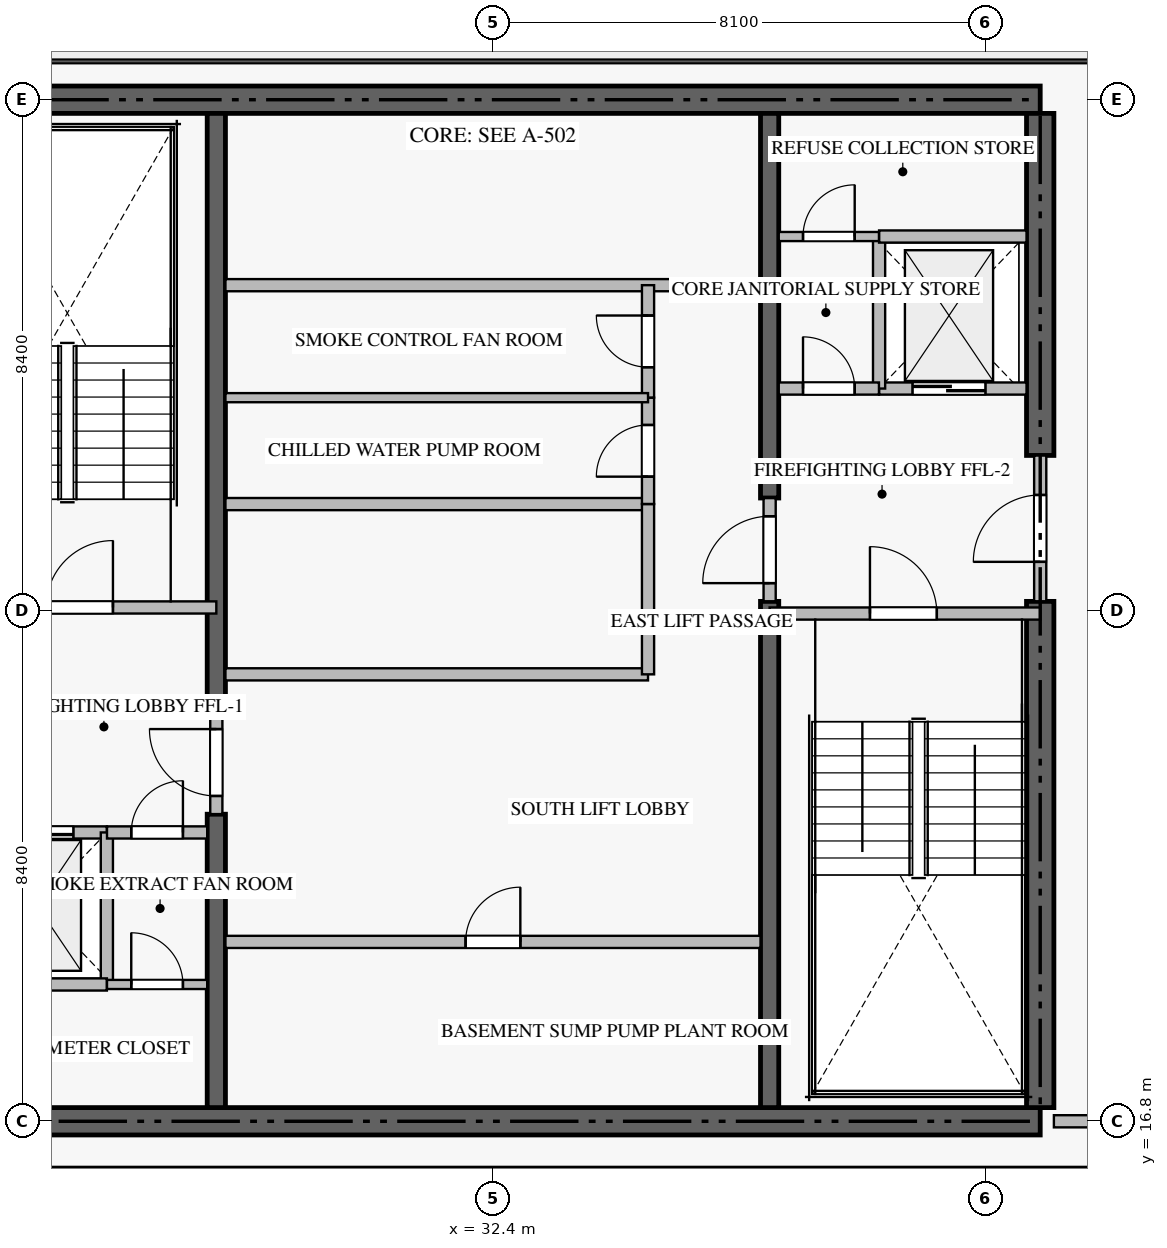
"""IFC4 building model, lengths in metres.
Left out: names, types, materials, properties, quantities, classifications, styles, units other than length and angle.
Written with IfcOpenShell. Run it as: python <this file> out.ifc"""

import sys

from ifc_helpers import new_model, si_unit, direction, frame, frame_2d, origin, place, context, subcontext, project, spatial, rectangle, extrude, source, transform, mapped, element, fill, save


model = new_model("IFC4")
c1 = context("Model", 3, precision=1e-05, world=origin(), true_north=direction((0.0, 1.0)))
c2 = subcontext(c1, "Body", "Model", "MODEL_VIEW")
j1 = project(units=[si_unit("LENGTHUNIT", "METRE"), si_unit("PLANEANGLEUNIT", "RADIAN")], contexts=[c1])
p1 = place(None, origin())
s1 = spatial("IfcSite", under=j1, at=p1, CompositionType="ELEMENT")
p2 = place(p1, origin())
s2 = spatial("IfcBuilding", under=s1, at=p2, CompositionType="ELEMENT")
p3 = place(p2, frame((0.0, 0.0, -7.2)))
s3 = spatial("IfcBuildingStorey", under=s2, at=p3, CompositionType="ELEMENT", Elevation=-7.2)
for number, where, z_axis, x_axis in (
    (1, (23.4, 16.8, -0.36), (0.0, 0.0, 1.0), (1.0, 0.0, 0.0)),
    (2, (41.4, 33.6, -0.36), (0.0, 0.0, 1.0), (-1.0, 0.0, 0.0)),
):
    element("IfcWall", number, at=place(p3, frame(where, z_axis=z_axis, x_axis=x_axis)), inside=s3, PredefinedType="SHEAR", context=c2, shape_type="SweptSolid", body=[
        extrude(rectangle(XDim=18.0, YDim=0.45, at=frame_2d((9.0, 0.0))), origin(), (0.0, 0.0, 1.0), 3.598),
    ])
p4 = place(p3, frame((41.4, 17.025, -0.36), z_axis=(0.0, 0.0, 1.0), x_axis=(0.0, 1.0, 0.0)))
e3 = element("IfcWall", 3, at=p4, inside=s3, PredefinedType="SHEAR", context=c2, shape_type="SweptSolid", body=[
    extrude(rectangle(XDim=8.325, YDim=0.45, at=frame_2d((4.163, 0.0))), origin(), (0.0, 0.0, 1.0), 3.598),
])
p5 = place(p3, frame((41.4, 27.75, -0.36), z_axis=(0.0, 0.0, 1.0), x_axis=(0.0, 1.0, 0.0)))
e4 = element("IfcWall", 4, at=p5, inside=s3, PredefinedType="SHEAR", context=c2, shape_type="SweptSolid", body=[
    extrude(rectangle(XDim=5.625, YDim=0.45, at=frame_2d((2.812, 0.0))), origin(), (0.0, 0.0, 1.0), 3.598),
])
p6 = place(p3, frame((27.85, 17.025, -0.36), z_axis=(0.0, 0.0, 1.0), x_axis=(0.0, 1.0, 0.0)))
e5 = element("IfcWall", 5, at=p6, inside=s3, PredefinedType="SHEAR", context=c2, shape_type="SweptSolid", body=[
    extrude(rectangle(XDim=4.825, YDim=0.3, at=frame_2d((2.413, 0.0))), origin(), (0.0, 0.0, 1.0), 3.598),
])
p7 = place(p3, frame((27.85, 23.55, -0.36), z_axis=(0.0, 0.0, 1.0), x_axis=(0.0, 1.0, 0.0)))
e6 = element("IfcWall", 6, at=p7, inside=s3, PredefinedType="SHEAR", context=c2, shape_type="SweptSolid", body=[
    extrude(rectangle(XDim=9.825, YDim=0.3, at=frame_2d((4.913, 0.0))), origin(), (0.0, 0.0, 1.0), 3.598),
])
p8 = place(p3, frame((36.95, 17.025, -0.36), z_axis=(0.0, 0.0, 1.0), x_axis=(0.0, 1.0, 0.0)))
e7 = element("IfcWall", 7, at=p8, inside=s3, PredefinedType="SHEAR", context=c2, shape_type="SweptSolid", body=[
    extrude(rectangle(XDim=8.325, YDim=0.3, at=frame_2d((4.163, 0.0))), origin(), (0.0, 0.0, 1.0), 3.598),
])
p9 = place(p3, frame((36.95, 27.05, -0.36), z_axis=(0.0, 0.0, 1.0), x_axis=(0.0, 1.0, 0.0)))
e8 = element("IfcWall", 8, at=p9, inside=s3, PredefinedType="SHEAR", context=c2, shape_type="SweptSolid", body=[
    extrude(rectangle(XDim=6.325, YDim=0.3, at=frame_2d((3.163, 0.0))), origin(), (0.0, 0.0, 1.0), 3.598),
])
p10 = place(p3, frame((23.4, 25.25, 0.0), z_axis=(0.0, 0.0, 1.0), x_axis=(1.0, 0.0, 0.0)))
e9 = element("IfcWall", 9, at=p10, inside=s3, PredefinedType="STANDARD", context=c2, shape_type="SweptSolid", body=[
    extrude(rectangle(XDim=4.45, YDim=0.2, at=frame_2d((2.225, 0.0))), origin(), (0.0, 0.0, 1.0), 3.24),
])
p11 = place(p10, frame((1.65, 0.0, 0.0)))
e10 = element("IfcOpeningElement", 10, at=p11, cuts=e9, PredefinedType="OPENING", context=c2, shape_type="SweptSolid", body=[
    extrude(rectangle(XDim=1.1, YDim=2.15, at=frame_2d((0.55, 1.075))), frame((0.0, 0.11, 0.0), z_axis=(0.0, -1.0, 0.0), x_axis=(1.0, 0.0, 0.0)), (0.0, 0.0, 1.0), 0.22),
])
p12 = place(p3, frame((36.95, 25.15, 0.0), z_axis=(0.0, 0.0, 1.0), x_axis=(1.0, 0.0, 0.0)))
e11 = element("IfcWall", 11, at=p12, inside=s3, PredefinedType="STANDARD", context=c2, shape_type="SweptSolid", body=[
    extrude(rectangle(XDim=4.45, YDim=0.2, at=frame_2d((2.225, 0.0))), origin(), (0.0, 0.0, 1.0), 3.24),
])
p13 = place(p12, frame((1.65, 0.0, 0.0)))
e12 = element("IfcOpeningElement", 12, at=p13, cuts=e11, PredefinedType="OPENING", context=c2, shape_type="SweptSolid", body=[
    extrude(rectangle(XDim=1.1, YDim=2.15, at=frame_2d((0.55, 1.075))), frame((0.0, 0.11, 0.0), z_axis=(0.0, -1.0, 0.0), x_axis=(1.0, 0.0, 0.0)), (0.0, 0.0, 1.0), 0.22),
])
p14 = place(p3, frame((23.625, 21.55, 0.0), z_axis=(0.0, 0.0, 1.0), x_axis=(1.0, 0.0, 0.0)))
e13 = element("IfcWall", 13, at=p14, inside=s3, PredefinedType="STANDARD", context=c2, shape_type="SweptSolid", body=[
    extrude(rectangle(XDim=2.425, YDim=0.2, at=frame_2d((1.212, 0.0))), origin(), (0.0, 0.0, 1.0), 3.24),
])
p15 = place(p14, frame((0.675, 0.0, 0.0)))
e14 = element("IfcOpeningElement", 14, at=p15, cuts=e13, PredefinedType="OPENING", context=c2, shape_type="SweptSolid", body=[
    extrude(rectangle(XDim=1.2, YDim=2.2, at=frame_2d((0.6, 1.1))), frame((0.0, 0.11, 0.0), z_axis=(0.0, -1.0, 0.0), x_axis=(1.0, 0.0, 0.0)), (0.0, 0.0, 1.0), 0.22),
])
p16 = place(p3, frame((38.75, 28.85, 0.0), z_axis=(0.0, 0.0, 1.0), x_axis=(1.0, 0.0, 0.0)))
e15 = element("IfcWall", 15, at=p16, inside=s3, PredefinedType="STANDARD", context=c2, shape_type="SweptSolid", body=[
    extrude(rectangle(XDim=2.425, YDim=0.2, at=frame_2d((1.212, 0.0))), origin(), (0.0, 0.0, 1.0), 3.24),
])
p17 = place(p16, frame((0.55, 0.0, 0.0)))
e16 = element("IfcOpeningElement", 16, at=p17, cuts=e15, PredefinedType="OPENING", context=c2, shape_type="SweptSolid", body=[
    extrude(rectangle(XDim=1.2, YDim=2.2, at=frame_2d((0.6, 1.1))), frame((0.0, 0.11, 0.0), z_axis=(0.0, -1.0, 0.0), x_axis=(1.0, 0.0, 0.0)), (0.0, 0.0, 1.0), 0.22),
])
p18 = place(p3, frame((26.05, 19.05, 0.0), z_axis=(0.0, 0.0, 1.0), x_axis=(0.0, 1.0, 0.0)))
e17 = element("IfcWall", 17, at=p18, inside=s3, PredefinedType="STANDARD", context=c2, shape_type="SweptSolid", body=[
    extrude(rectangle(XDim=2.5, YDim=0.2, at=frame_2d((1.25, 0.0))), origin(), (0.0, 0.0, 1.0), 3.24),
])
p19 = place(p3, frame((23.625, 19.05, 0.0), z_axis=(0.0, 0.0, 1.0), x_axis=(1.0, 0.0, 0.0)))
e18 = element("IfcWall", 18, at=p19, inside=s3, PredefinedType="STANDARD", context=c2, shape_type="SweptSolid", body=[
    extrude(rectangle(XDim=2.425, YDim=0.2, at=frame_2d((1.212, 0.0))), origin(), (0.0, 0.0, 1.0), 3.24),
])
p20 = place(p3, frame((26.052, 21.55, 0.0), z_axis=(0.0, 0.0, 1.0), x_axis=(1.0, 0.0, 0.0)))
e19 = element("IfcWall", 19, at=p20, inside=s3, PredefinedType="STANDARD", context=c2, shape_type="SweptSolid", body=[
    extrude(rectangle(XDim=1.648, YDim=0.2, at=frame_2d((0.824, 0.0))), origin(), (0.0, 0.0, 1.0), 3.24),
])
p21 = place(p20, frame((0.399, 0.0, 0.0)))
e20 = element("IfcOpeningElement", 20, at=p21, cuts=e19, PredefinedType="OPENING", context=c2, shape_type="SweptSolid", body=[
    extrude(rectangle(XDim=0.85, YDim=2.1, at=frame_2d((0.425, 1.05))), frame((0.0, 0.11, 0.0), z_axis=(0.0, -1.0, 0.0), x_axis=(1.0, 0.0, 0.0)), (0.0, 0.0, 1.0), 0.22),
])
p22 = place(p3, frame((38.75, 28.85, 0.0), z_axis=(0.0, 0.0, 1.0), x_axis=(0.0, 1.0, 0.0)))
e21 = element("IfcWall", 21, at=p22, inside=s3, PredefinedType="STANDARD", context=c2, shape_type="SweptSolid", body=[
    extrude(rectangle(XDim=2.5, YDim=0.2, at=frame_2d((1.25, 0.0))), origin(), (0.0, 0.0, 1.0), 3.24),
])
p23 = place(p3, frame((38.75, 31.35, 0.0), z_axis=(0.0, 0.0, 1.0), x_axis=(1.0, 0.0, 0.0)))
e22 = element("IfcWall", 22, at=p23, inside=s3, PredefinedType="STANDARD", context=c2, shape_type="SweptSolid", body=[
    extrude(rectangle(XDim=2.425, YDim=0.2, at=frame_2d((1.212, 0.0))), origin(), (0.0, 0.0, 1.0), 3.24),
])
p24 = place(p3, frame((37.1, 28.85, 0.0), z_axis=(0.0, 0.0, 1.0), x_axis=(1.0, 0.0, 0.0)))
e23 = element("IfcWall", 23, at=p24, inside=s3, PredefinedType="STANDARD", context=c2, shape_type="SweptSolid", body=[
    extrude(rectangle(XDim=1.648, YDim=0.2, at=frame_2d((0.824, 0.0))), origin(), (0.0, 0.0, 1.0), 3.24),
])
p25 = place(p24, frame((0.399, 0.0, 0.0)))
e24 = element("IfcOpeningElement", 24, at=p25, cuts=e23, PredefinedType="OPENING", context=c2, shape_type="SweptSolid", body=[
    extrude(rectangle(XDim=0.85, YDim=2.1, at=frame_2d((0.425, 1.05))), frame((0.0, 0.11, 0.0), z_axis=(0.0, -1.0, 0.0), x_axis=(1.0, 0.0, 0.0)), (0.0, 0.0, 1.0), 0.22),
])
p26 = place(p3, frame((41.4, 25.352, 0.0), z_axis=(0.0, 0.0, 1.0), x_axis=(0.0, 1.0, 0.0)))
e25 = element("IfcWall", 25, at=p26, inside=s3, PredefinedType="STANDARD", context=c2, shape_type="SweptSolid", body=[
    extrude(rectangle(XDim=2.396, YDim=0.2, at=frame_2d((1.198, 0.0))), origin(), (0.0, 0.0, 1.0), 3.24),
])
p27 = place(p26, frame((0.648, 0.0, 0.0)))
e26 = element("IfcOpeningElement", 26, at=p27, cuts=e25, PredefinedType="OPENING", context=c2, shape_type="SweptSolid", body=[
    extrude(rectangle(XDim=1.1, YDim=2.15, at=frame_2d((0.55, 1.075))), frame((0.0, 0.11, 0.0), z_axis=(0.0, -1.0, 0.0), x_axis=(1.0, 0.0, 0.0)), (0.0, 0.0, 1.0), 0.22),
])
p28 = place(p3, frame((27.85, 21.852, 0.0), z_axis=(0.0, 0.0, 1.0), x_axis=(0.0, 1.0, 0.0)))
e27 = element("IfcWall", 27, at=p28, inside=s3, PredefinedType="STANDARD", context=c2, shape_type="SweptSolid", body=[
    extrude(rectangle(XDim=1.696, YDim=0.2, at=frame_2d((0.848, 0.0))), origin(), (0.0, 0.0, 1.0), 3.24),
])
p29 = place(p28, frame((0.298, 0.0, 0.0)))
e28 = element("IfcOpeningElement", 28, at=p29, cuts=e27, PredefinedType="OPENING", context=c2, shape_type="SweptSolid", body=[
    extrude(rectangle(XDim=1.1, YDim=2.15, at=frame_2d((0.55, 1.075))), frame((0.0, 0.11, 0.0), z_axis=(0.0, -1.0, 0.0), x_axis=(1.0, 0.0, 0.0)), (0.0, 0.0, 1.0), 0.22),
])
p30 = place(p3, frame((36.95, 25.352, 0.0), z_axis=(0.0, 0.0, 1.0), x_axis=(0.0, 1.0, 0.0)))
e29 = element("IfcWall", 29, at=p30, inside=s3, PredefinedType="STANDARD", context=c2, shape_type="SweptSolid", body=[
    extrude(rectangle(XDim=1.696, YDim=0.2, at=frame_2d((0.848, 0.0))), origin(), (0.0, 0.0, 1.0), 3.24),
])
p31 = place(p30, frame((0.298, 0.0, 0.0)))
e30 = element("IfcOpeningElement", 30, at=p31, cuts=e29, PredefinedType="OPENING", context=c2, shape_type="SweptSolid", body=[
    extrude(rectangle(XDim=1.1, YDim=2.15, at=frame_2d((0.55, 1.075))), frame((0.0, 0.11, 0.0), z_axis=(0.0, -1.0, 0.0), x_axis=(1.0, 0.0, 0.0)), (0.0, 0.0, 1.0), 0.22),
])
p32 = place(p3, frame((28.0, 30.55, 0.0), z_axis=(0.0, 0.0, 1.0), x_axis=(1.0, 0.0, 0.0)))
e31 = element("IfcWall", 31, at=p32, inside=s3, PredefinedType="STANDARD", context=c2, shape_type="SweptSolid", body=[
    extrude(rectangle(XDim=8.8, YDim=0.2, at=frame_2d((4.4, 0.0))), origin(), (0.0, 0.0, 1.0), 3.24),
])
p33 = place(p3, frame((28.0, 19.75, 0.0), z_axis=(0.0, 0.0, 1.0), x_axis=(1.0, 0.0, 0.0)))
e32 = element("IfcWall", 32, at=p33, inside=s3, PredefinedType="STANDARD", context=c2, shape_type="SweptSolid", body=[
    extrude(rectangle(XDim=8.8, YDim=0.2, at=frame_2d((4.4, 0.0))), origin(), (0.0, 0.0, 1.0), 3.24),
])
p34 = place(p33, frame((3.95, 0.0, 0.0)))
e33 = element("IfcOpeningElement", 33, at=p34, cuts=e32, PredefinedType="OPENING", context=c2, shape_type="SweptSolid", body=[
    extrude(rectangle(XDim=0.9, YDim=2.1, at=frame_2d((0.45, 1.05))), frame((0.0, 0.11, 0.0), z_axis=(0.0, -1.0, 0.0), x_axis=(1.0, 0.0, 0.0)), (0.0, 0.0, 1.0), 0.22),
])
for number, where, z_axis, x_axis in (
    (34, (28.0, 24.15, 0.0), (0.0, 0.0, 1.0), (1.0, 0.0, 0.0)),
    (35, (28.0, 26.95, 0.0), (0.0, 0.0, 1.0), (1.0, 0.0, 0.0)),
):
    element("IfcWall", number, at=place(p3, frame(where, z_axis=z_axis, x_axis=x_axis)), inside=s3, PredefinedType="STANDARD", context=c2, shape_type="SweptSolid", body=[
        extrude(rectangle(XDim=6.95, YDim=0.2, at=frame_2d((3.475, 0.0))), origin(), (0.0, 0.0, 1.0), 3.24),
    ])
p35 = place(p3, frame((34.95, 24.15, 0.0), z_axis=(0.0, 0.0, 1.0), x_axis=(0.0, 1.0, 0.0)))
e36 = element("IfcWall", 36, at=p35, inside=s3, PredefinedType="STANDARD", context=c2, shape_type="SweptSolid", body=[
    extrude(rectangle(XDim=2.8, YDim=0.2, at=frame_2d((1.4, 0.0))), origin(), (0.0, 0.0, 1.0), 3.24),
])
p36 = place(p3, frame((26.052, 19.05, 0.0), z_axis=(0.0, 0.0, 1.0), x_axis=(1.0, 0.0, 0.0)))
e37 = element("IfcWall", 37, at=p36, inside=s3, PredefinedType="PARTITIONING", context=c2, shape_type="SweptSolid", body=[
    extrude(rectangle(XDim=1.648, YDim=0.15, at=frame_2d((0.824, 0.0))), origin(), (0.0, 0.0, 1.0), 3.24),
])
p37 = place(p36, frame((0.399, 0.0, 0.0)))
e38 = element("IfcOpeningElement", 38, at=p37, cuts=e37, PredefinedType="OPENING", context=c2, shape_type="SweptSolid", body=[
    extrude(rectangle(XDim=0.85, YDim=2.1, at=frame_2d((0.425, 1.05))), frame((0.0, 0.085, 0.0), z_axis=(0.0, -1.0, 0.0), x_axis=(1.0, 0.0, 0.0)), (0.0, 0.0, 1.0), 0.17),
])
p38 = place(p3, frame((37.1, 31.35, 0.0), z_axis=(0.0, 0.0, 1.0), x_axis=(1.0, 0.0, 0.0)))
e39 = element("IfcWall", 39, at=p38, inside=s3, PredefinedType="PARTITIONING", context=c2, shape_type="SweptSolid", body=[
    extrude(rectangle(XDim=1.648, YDim=0.15, at=frame_2d((0.824, 0.0))), origin(), (0.0, 0.0, 1.0), 3.24),
])
p39 = place(p38, frame((0.399, 0.0, 0.0)))
e40 = element("IfcOpeningElement", 40, at=p39, cuts=e39, PredefinedType="OPENING", context=c2, shape_type="SweptSolid", body=[
    extrude(rectangle(XDim=0.85, YDim=2.1, at=frame_2d((0.425, 1.05))), frame((0.0, 0.085, 0.0), z_axis=(0.0, -1.0, 0.0), x_axis=(1.0, 0.0, 0.0)), (0.0, 0.0, 1.0), 0.17),
])
p40 = place(p3, frame((34.95, 26.952, 0.0), z_axis=(0.0, 0.0, 1.0), x_axis=(0.0, 1.0, 0.0)))
e41 = element("IfcWall", 41, at=p40, inside=s3, PredefinedType="STANDARD", context=c2, shape_type="SweptSolid", body=[
    extrude(rectangle(XDim=1.748, YDim=0.2, at=frame_2d((0.874, 0.0))), origin(), (0.0, 0.0, 1.0), 3.24),
])
p41 = place(p40, frame((0.449, 0.0, 0.0)))
e42 = element("IfcOpeningElement", 42, at=p41, cuts=e41, PredefinedType="OPENING", context=c2, shape_type="SweptSolid", body=[
    extrude(rectangle(XDim=0.85, YDim=2.1, at=frame_2d((0.425, 1.05))), frame((0.0, 0.11, 0.0), z_axis=(0.0, -1.0, 0.0), x_axis=(1.0, 0.0, 0.0)), (0.0, 0.0, 1.0), 0.22),
])
p42 = place(p3, frame((34.95, 28.702, 0.0), z_axis=(0.0, 0.0, 1.0), x_axis=(0.0, 1.0, 0.0)))
e43 = element("IfcWall", 43, at=p42, inside=s3, PredefinedType="STANDARD", context=c2, shape_type="SweptSolid", body=[
    extrude(rectangle(XDim=1.848, YDim=0.2, at=frame_2d((0.924, 0.0))), origin(), (0.0, 0.0, 1.0), 3.24),
])
p43 = place(p42, frame((0.499, 0.0, 0.0)))
e44 = element("IfcOpeningElement", 44, at=p43, cuts=e43, PredefinedType="OPENING", context=c2, shape_type="SweptSolid", body=[
    extrude(rectangle(XDim=0.85, YDim=2.1, at=frame_2d((0.425, 1.05))), frame((0.0, 0.11, 0.0), z_axis=(0.0, -1.0, 0.0), x_axis=(1.0, 0.0, 0.0)), (0.0, 0.0, 1.0), 0.22),
])
p44 = place(p3, frame((28.0, 28.7, 0.0), z_axis=(0.0, 0.0, 1.0), x_axis=(1.0, 0.0, 0.0)))
e45 = element("IfcWall", 45, at=p44, inside=s3, PredefinedType="PARTITIONING", context=c2, shape_type="SweptSolid", body=[
    extrude(rectangle(XDim=6.95, YDim=0.15, at=frame_2d((3.475, 0.0))), origin(), (0.0, 0.0, 1.0), 3.24),
])
p45 = place(p3, frame((41.625, 16.8, 0.0), z_axis=(0.0, 0.0, 1.0), x_axis=(1.0, 0.0, 0.0)))
e46 = element("IfcWall", 46, at=p45, inside=s3, PredefinedType="STANDARD", context=c2, shape_type="SweptSolid", body=[
    extrude(rectangle(XDim=22.725, YDim=0.2, at=frame_2d((11.363, 0.0))), origin(), (0.0, 0.0, 1.0), 2.672),
])
p46 = place(p45, frame((4.697, 0.0, 0.0)))
e47 = element("IfcOpeningElement", 47, at=p46, cuts=e46, PredefinedType="OPENING", context=c2, shape_type="SweptSolid", body=[
    extrude(rectangle(XDim=3.8, YDim=2.5, at=frame_2d((1.9, 1.25))), frame((0.0, 0.11, 0.0), z_axis=(0.0, -1.0, 0.0), x_axis=(1.0, 0.0, 0.0)), (0.0, 0.0, 1.0), 0.22),
])
m1 = source(origin(), c2, "Body", "SweptSolid", [
    extrude(rectangle(XDim=1.1, YDim=2.15, at=frame_2d((0.55, 1.075))), frame((0.0, 0.025, 0.0), z_axis=(0.0, -1.0, 0.0), x_axis=(1.0, 0.0, 0.0)), (0.0, 0.0, 1.0), 0.05),
])
p47 = place(p11, origin())
e48 = element("IfcDoor", 48, at=p47, inside=s3, OperationType="SINGLE_SWING_RIGHT", PredefinedType="DOOR", context=c2, shape_type="MappedRepresentation", body=[
    mapped(m1, transform((0.0, 0.0, 0.0), scale=1.0)),
])
fill(e10, e48)
p48 = place(p13, origin())
e49 = element("IfcDoor", 49, at=p48, inside=s3, OperationType="SINGLE_SWING_LEFT", PredefinedType="DOOR", context=c2, shape_type="MappedRepresentation", body=[
    mapped(m1, transform((0.0, 0.0, 0.0), scale=1.0)),
])
fill(e12, e49)
m2 = source(origin(), c2, "Body", "SweptSolid", [
    extrude(rectangle(XDim=1.2, YDim=2.2, at=frame_2d((0.6, 1.1))), frame((0.0, 0.025, 0.0), z_axis=(0.0, -1.0, 0.0), x_axis=(1.0, 0.0, 0.0)), (0.0, 0.0, 1.0), 0.05),
])
p49 = place(p15, origin())
e50 = element("IfcDoor", 50, at=p49, inside=s3, OperationType="DOUBLE_DOOR_SLIDING", PredefinedType="DOOR", context=c2, shape_type="MappedRepresentation", body=[
    mapped(m2, transform((0.0, 0.0, 0.0), scale=1.0)),
])
fill(e14, e50)
p50 = place(p17, origin())
e51 = element("IfcDoor", 51, at=p50, inside=s3, OperationType="DOUBLE_DOOR_SLIDING", PredefinedType="DOOR", context=c2, shape_type="MappedRepresentation", body=[
    mapped(m2, transform((0.0, 0.0, 0.0), scale=1.0)),
])
fill(e16, e51)
m3 = source(origin(), c2, "Body", "SweptSolid", [
    extrude(rectangle(XDim=0.85, YDim=2.1, at=frame_2d((0.425, 1.05))), frame((0.0, 0.025, 0.0), z_axis=(0.0, -1.0, 0.0), x_axis=(1.0, 0.0, 0.0)), (0.0, 0.0, 1.0), 0.05),
])
p51 = place(p21, origin())
e52 = element("IfcDoor", 52, at=p51, inside=s3, OperationType="SINGLE_SWING_RIGHT", PredefinedType="DOOR", context=c2, shape_type="MappedRepresentation", body=[
    mapped(m3, transform((0.0, 0.0, 0.0), scale=1.0)),
])
fill(e20, e52)
p52 = place(p25, origin())
e53 = element("IfcDoor", 53, at=p52, inside=s3, OperationType="SINGLE_SWING_LEFT", PredefinedType="DOOR", context=c2, shape_type="MappedRepresentation", body=[
    mapped(m3, transform((0.0, 0.0, 0.0), scale=1.0)),
])
fill(e24, e53)
p53 = place(p27, origin())
e54 = element("IfcDoor", 54, at=p53, inside=s3, OperationType="SINGLE_SWING_LEFT", PredefinedType="DOOR", context=c2, shape_type="MappedRepresentation", body=[
    mapped(m1, transform((0.0, 0.0, 0.0), scale=1.0)),
])
fill(e26, e54)
p54 = place(p29, origin())
e55 = element("IfcDoor", 55, at=p54, inside=s3, OperationType="SINGLE_SWING_RIGHT", PredefinedType="DOOR", context=c2, shape_type="MappedRepresentation", body=[
    mapped(m1, transform((0.0, 0.0, 0.0), scale=1.0)),
])
fill(e28, e55)
p55 = place(p31, origin())
e56 = element("IfcDoor", 56, at=p55, inside=s3, OperationType="SINGLE_SWING_LEFT", PredefinedType="DOOR", context=c2, shape_type="MappedRepresentation", body=[
    mapped(m1, transform((0.0, 0.0, 0.0), scale=1.0)),
])
fill(e30, e56)
m4 = source(origin(), c2, "Body", "SweptSolid", [
    extrude(rectangle(XDim=0.9, YDim=2.1, at=frame_2d((0.45, 1.05))), frame((0.0, 0.025, 0.0), z_axis=(0.0, -1.0, 0.0), x_axis=(1.0, 0.0, 0.0)), (0.0, 0.0, 1.0), 0.05),
])
p56 = place(p34, origin())
e57 = element("IfcDoor", 57, at=p56, inside=s3, OperationType="SINGLE_SWING_RIGHT", PredefinedType="DOOR", context=c2, shape_type="MappedRepresentation", body=[
    mapped(m4, transform((0.0, 0.0, 0.0), scale=1.0)),
])
fill(e33, e57)
p57 = place(p37, origin())
e58 = element("IfcDoor", 58, at=p57, inside=s3, OperationType="SINGLE_SWING_LEFT", PredefinedType="DOOR", context=c2, shape_type="MappedRepresentation", body=[
    mapped(m3, transform((0.0, 0.0, 0.0), scale=1.0)),
])
fill(e38, e58)
p58 = place(p39, origin())
e59 = element("IfcDoor", 59, at=p58, inside=s3, OperationType="SINGLE_SWING_RIGHT", PredefinedType="DOOR", context=c2, shape_type="MappedRepresentation", body=[
    mapped(m3, transform((0.0, 0.0, 0.0), scale=1.0)),
])
fill(e40, e59)
p59 = place(p41, origin())
e60 = element("IfcDoor", 60, at=p59, inside=s3, OperationType="SINGLE_SWING_LEFT", PredefinedType="DOOR", context=c2, shape_type="MappedRepresentation", body=[
    mapped(m3, transform((0.0, 0.0, 0.0), scale=1.0)),
])
fill(e42, e60)
p60 = place(p43, origin())
e61 = element("IfcDoor", 61, at=p60, inside=s3, OperationType="SINGLE_SWING_RIGHT", PredefinedType="DOOR", context=c2, shape_type="MappedRepresentation", body=[
    mapped(m3, transform((0.0, 0.0, 0.0), scale=1.0)),
])
fill(e44, e61)
save(model, sys.argv[1])
